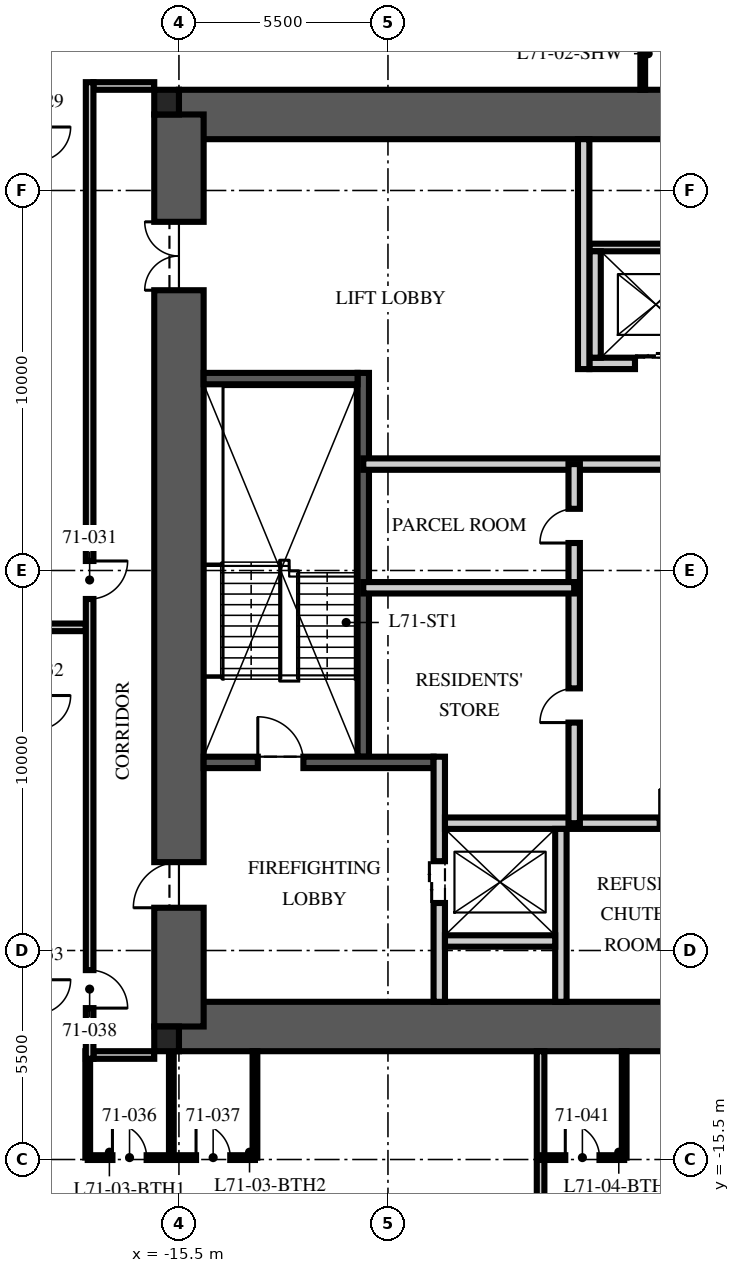
"""IFC4 building model, lengths in metres.
Left out: names, types, materials, properties, quantities, classifications, styles, units other than length and angle.
Written with IfcOpenShell. Run it as: python <this file> out.ifc"""

import sys

from ifc_helpers import new_model, si_unit, direction, frame, frame_2d, origin, origin_2d, place, context, subcontext, project, spatial, rectangle, extrude, element, fill, save


model = new_model("IFC4")
c1 = context("Model", 3, precision=1e-05, world=origin(), true_north=direction((0.0, 1.0)))
c2 = subcontext(c1, "Body", "Model", "MODEL_VIEW")
j1 = project(units=[si_unit("LENGTHUNIT", "METRE"), si_unit("PLANEANGLEUNIT", "RADIAN")], contexts=[c1])
p1 = place(None, origin())
s1 = spatial("IfcSite", under=j1, at=p1, CompositionType="ELEMENT")
p2 = place(p1, origin())
s2 = spatial("IfcBuilding", under=s1, at=p2, CompositionType="ELEMENT")
p3 = place(p2, frame((0.0, 0.0, 285.75)))
s3 = spatial("IfcBuildingStorey", under=s2, at=p3, CompositionType="ELEMENT", Elevation=285.75)
for number, where, z_axis, x_axis in (
    (1, (-15.5, 12.0, -0.25), (0.0, 0.0, 1.0), (1.0, 0.0, 0.0)),
    (2, (-15.5, -12.0, -0.25), (0.0, 0.0, 1.0), (1.0, 0.0, 0.0)),
):
    element("IfcWall", number, at=place(p3, frame(where, z_axis=z_axis, x_axis=x_axis)), inside=s3, PredefinedType="SHEAR", context=c2, shape_type="SweptSolid", body=[
        extrude(rectangle(XDim=31.0, YDim=1.3, at=frame_2d((15.5, 0.0))), origin(), (0.0, 0.0, 1.0), 3.75),
    ])
p4 = place(p3, frame((-15.5, -12.0, -0.25), z_axis=(0.0, 0.0, 1.0), x_axis=(0.0, 1.0, 0.0)))
e3 = element("IfcWall", 3, at=p4, inside=s3, PredefinedType="SHEAR", context=c2, shape_type="SweptSolid", body=[
    extrude(rectangle(XDim=24.0, YDim=1.3, at=frame_2d((12.0, 0.0))), origin(), (0.0, 0.0, 1.0), 3.75),
])
p5 = place(p4, frame((3.125, 0.0, 0.25)))
e4 = element("IfcOpeningElement", 4, at=p5, cuts=e3, PredefinedType="OPENING", context=c2, shape_type="SweptSolid", body=[
    extrude(rectangle(XDim=1.2, YDim=2.1, at=frame_2d((0.6, 1.05))), frame((0.0, 0.66, 0.0), z_axis=(0.0, -1.0, 0.0), x_axis=(1.0, 0.0, 0.0)), (0.0, 0.0, 1.0), 1.32),
])
p6 = place(p4, frame((19.375, 0.0, 0.25)))
e5 = element("IfcOpeningElement", 5, at=p6, cuts=e3, PredefinedType="OPENING", context=c2, shape_type="SweptSolid", body=[
    extrude(rectangle(XDim=1.8, YDim=2.1, at=frame_2d((0.9, 1.05))), frame((0.0, 0.66, 0.0), z_axis=(0.0, -1.0, 0.0), x_axis=(1.0, 0.0, 0.0)), (0.0, 0.0, 1.0), 1.32),
])
for number, where, z_axis, x_axis in (
    (6, (-15.825, 12.325, -0.25), (0.0, 0.0, 1.0), (1.0, 0.0, 0.0)),
    (7, (-15.825, -12.325, -0.25), (0.0, 0.0, 1.0), (1.0, 0.0, 0.0)),
):
    element("IfcColumn", number, at=place(p3, frame(where, z_axis=z_axis, x_axis=x_axis)), inside=s3, PredefinedType="COLUMN", context=c2, shape_type="SweptSolid", body=[
        extrude(rectangle(XDim=0.65, YDim=0.65, at=origin_2d()), origin(), (0.0, 0.0, 1.0), 3.75),
    ])
p7 = place(p3, frame((-10.65, -4.9, 0.0), z_axis=(0.0, 0.0, 1.0), x_axis=(0.0, 1.0, 0.0)))
e8 = element("IfcWall", 8, at=p7, inside=s3, PredefinedType="SOLIDWALL", context=c2, shape_type="SweptSolid", body=[
    extrude(rectangle(XDim=10.1, YDim=0.3, at=frame_2d((5.05, 0.0))), origin(), (0.0, 0.0, 1.0), 3.5),
])
p8 = place(p3, frame((-14.85, -5.05, 0.0), z_axis=(0.0, 0.0, 1.0), x_axis=(1.0, 0.0, 0.0)))
e9 = element("IfcWall", 9, at=p8, inside=s3, PredefinedType="SOLIDWALL", context=c2, shape_type="SweptSolid", body=[
    extrude(rectangle(XDim=6.05, YDim=0.3, at=frame_2d((3.025, 0.0))), origin(), (0.0, 0.0, 1.0), 3.5),
])
p9 = place(p8, frame((1.425, 0.0, 0.0)))
e10 = element("IfcOpeningElement", 10, at=p9, cuts=e9, PredefinedType="OPENING", context=c2, shape_type="SweptSolid", body=[
    extrude(rectangle(XDim=1.2, YDim=2.1, at=frame_2d((0.6, 1.05))), frame((0.0, 0.16, 0.0), z_axis=(0.0, -1.0, 0.0), x_axis=(1.0, 0.0, 0.0)), (0.0, 0.0, 1.0), 0.32),
])
p10 = place(p3, frame((-14.85, 5.05, 0.0), z_axis=(0.0, 0.0, 1.0), x_axis=(1.0, 0.0, 0.0)))
e11 = element("IfcWall", 11, at=p10, inside=s3, PredefinedType="SOLIDWALL", context=c2, shape_type="SweptSolid", body=[
    extrude(rectangle(XDim=4.05, YDim=0.3, at=frame_2d((2.025, 0.0))), origin(), (0.0, 0.0, 1.0), 3.5),
])
p11 = place(p3, frame((-8.65, -11.35, 0.0), z_axis=(0.0, 0.0, 1.0), x_axis=(0.0, 1.0, 0.0)))
e12 = element("IfcWall", 12, at=p11, inside=s3, PredefinedType="PARTITIONING", context=c2, shape_type="SweptSolid", body=[
    extrude(rectangle(XDim=6.45, YDim=0.3, at=frame_2d((3.225, 0.0))), origin(), (0.0, 0.0, 1.0), 3.5),
])
p12 = place(p11, frame((2.6, 0.0, 0.0)))
e13 = element("IfcOpeningElement", 13, at=p12, cuts=e12, PredefinedType="OPENING", context=c2, shape_type="SweptSolid", body=[
    extrude(rectangle(XDim=1.1, YDim=2.1, at=frame_2d((0.55, 1.05))), frame((0.0, 0.16, 0.0), z_axis=(0.0, -1.0, 0.0), x_axis=(1.0, 0.0, 0.0)), (0.0, 0.0, 1.0), 0.32),
])
p13 = place(p3, frame((-8.5, -6.65, 0.0), z_axis=(0.0, 0.0, 1.0), x_axis=(1.0, 0.0, 0.0)))
e14 = element("IfcWall", 14, at=p13, inside=s3, PredefinedType="PARTITIONING", context=c2, shape_type="SweptSolid", body=[
    extrude(rectangle(XDim=17.0, YDim=0.3, at=frame_2d((8.5, 0.0))), origin(), (0.0, 0.0, 1.0), 3.5),
])
p14 = place(p13, frame((7.8, 0.0, 0.0)))
e15 = element("IfcOpeningElement", 15, at=p14, cuts=e14, PredefinedType="OPENING", context=c2, shape_type="SweptSolid", body=[
    extrude(rectangle(XDim=1.3, YDim=2.4, at=frame_2d((0.65, 1.2))), frame((0.0, 0.16, 0.0), z_axis=(0.0, -1.0, 0.0), x_axis=(1.0, 0.0, 0.0)), (0.0, 0.0, 1.0), 0.32),
])
p15 = place(p13, frame((5.65, 0.0, 0.0)))
e16 = element("IfcOpeningElement", 16, at=p15, cuts=e14, PredefinedType="OPENING", context=c2, shape_type="SweptSolid", body=[
    extrude(rectangle(XDim=0.9, YDim=2.1, at=frame_2d((0.45, 1.05))), frame((0.0, 0.16, 0.0), z_axis=(0.0, -1.0, 0.0), x_axis=(1.0, 0.0, 0.0)), (0.0, 0.0, 1.0), 0.32),
])
p16 = place(p13, frame((10.4, 0.0, 0.0)))
e17 = element("IfcOpeningElement", 17, at=p16, cuts=e14, PredefinedType="OPENING", context=c2, shape_type="SweptSolid", body=[
    extrude(rectangle(XDim=0.9, YDim=2.1, at=frame_2d((0.45, 1.05))), frame((0.0, 0.16, 0.0), z_axis=(0.0, -1.0, 0.0), x_axis=(1.0, 0.0, 0.0)), (0.0, 0.0, 1.0), 0.32),
])
p17 = place(p3, frame((-5.45, -11.35, 0.0), z_axis=(0.0, 0.0, 1.0), x_axis=(0.0, 1.0, 0.0)))
e18 = element("IfcWall", 18, at=p17, inside=s3, PredefinedType="PARTITIONING", context=c2, shape_type="SweptSolid", body=[
    extrude(rectangle(XDim=4.55, YDim=0.3, at=frame_2d((2.275, 0.0))), origin(), (0.0, 0.0, 1.0), 3.5),
])
p18 = place(p3, frame((-8.5, -9.75, 0.0), z_axis=(0.0, 0.0, 1.0), x_axis=(1.0, 0.0, 0.0)))
e19 = element("IfcWall", 19, at=p18, inside=s3, PredefinedType="PARTITIONING", context=c2, shape_type="SweptSolid", body=[
    extrude(rectangle(XDim=2.9, YDim=0.3, at=frame_2d((1.45, 0.0))), origin(), (0.0, 0.0, 1.0), 3.5),
])
p19 = place(p3, frame((-4.7, 5.45, 0.0), z_axis=(0.0, 0.0, 1.0), x_axis=(1.0, 0.0, 0.0)))
e20 = element("IfcWall", 20, at=p19, inside=s3, PredefinedType="PARTITIONING", context=c2, shape_type="SweptSolid", body=[
    extrude(rectangle(XDim=9.7, YDim=0.3, at=frame_2d((4.85, 0.0))), origin(), (0.0, 0.0, 1.0), 3.5),
])
p20 = place(p19, frame((1.2, 0.0, 0.0)))
e21 = element("IfcOpeningElement", 21, at=p20, cuts=e20, PredefinedType="OPENING", context=c2, shape_type="SweptSolid", body=[
    extrude(rectangle(XDim=1.1, YDim=2.1, at=frame_2d((0.55, 1.05))), frame((0.0, 0.16, 0.0), z_axis=(0.0, -1.0, 0.0), x_axis=(1.0, 0.0, 0.0)), (0.0, 0.0, 1.0), 0.32),
])
p21 = place(p19, frame((4.3, 0.0, 0.0)))
e22 = element("IfcOpeningElement", 22, at=p21, cuts=e20, PredefinedType="OPENING", context=c2, shape_type="SweptSolid", body=[
    extrude(rectangle(XDim=1.1, YDim=2.1, at=frame_2d((0.55, 1.05))), frame((0.0, 0.16, 0.0), z_axis=(0.0, -1.0, 0.0), x_axis=(1.0, 0.0, 0.0)), (0.0, 0.0, 1.0), 0.32),
])
p22 = place(p19, frame((7.4, 0.0, 0.0)))
e23 = element("IfcOpeningElement", 23, at=p22, cuts=e20, PredefinedType="OPENING", context=c2, shape_type="SweptSolid", body=[
    extrude(rectangle(XDim=1.1, YDim=2.1, at=frame_2d((0.55, 1.05))), frame((0.0, 0.16, 0.0), z_axis=(0.0, -1.0, 0.0), x_axis=(1.0, 0.0, 0.0)), (0.0, 0.0, 1.0), 0.32),
])
p23 = place(p3, frame((-4.7, 8.5, 0.0), z_axis=(0.0, 0.0, 1.0), x_axis=(1.0, 0.0, 0.0)))
e24 = element("IfcWall", 24, at=p23, inside=s3, PredefinedType="PARTITIONING", context=c2, shape_type="SweptSolid", body=[
    extrude(rectangle(XDim=9.7, YDim=0.2, at=frame_2d((4.85, 0.0))), origin(), (0.0, 0.0, 1.0), 3.5),
])
p24 = place(p3, frame((-4.55, 5.6, 0.0), z_axis=(0.0, 0.0, 1.0), x_axis=(0.0, 1.0, 0.0)))
e25 = element("IfcWall", 25, at=p24, inside=s3, PredefinedType="PARTITIONING", context=c2, shape_type="SweptSolid", body=[
    extrude(rectangle(XDim=2.8, YDim=0.3, at=frame_2d((1.4, 0.0))), origin(), (0.0, 0.0, 1.0), 3.5),
])
p25 = place(p3, frame((-10.65, 2.8, 0.0), z_axis=(0.0, 0.0, 1.0), x_axis=(1.0, 0.0, 0.0)))
e26 = element("IfcWall", 26, at=p25, inside=s3, PredefinedType="PARTITIONING", context=c2, shape_type="SweptSolid", body=[
    extrude(rectangle(XDim=21.3, YDim=0.3, at=frame_2d((10.65, 0.0))), origin(), (0.0, 0.0, 1.0), 3.5),
])
p26 = place(p25, frame((10.05, 0.0, 0.0)))
e27 = element("IfcOpeningElement", 27, at=p26, cuts=e26, PredefinedType="OPENING", context=c2, shape_type="SweptSolid", body=[
    extrude(rectangle(XDim=1.2, YDim=2.1, at=frame_2d((0.6, 1.05))), frame((0.0, 0.16, 0.0), z_axis=(0.0, -1.0, 0.0), x_axis=(1.0, 0.0, 0.0)), (0.0, 0.0, 1.0), 0.32),
])
p27 = place(p25, frame((19.121, 0.0, 0.0)))
e28 = element("IfcOpeningElement", 28, at=p27, cuts=e26, PredefinedType="OPENING", context=c2, shape_type="SweptSolid", body=[
    extrude(rectangle(XDim=0.9, YDim=2.1, at=frame_2d((0.45, 1.05))), frame((0.0, 0.16, 0.0), z_axis=(0.0, -1.0, 0.0), x_axis=(1.0, 0.0, 0.0)), (0.0, 0.0, 1.0), 0.32),
])
p28 = place(p3, frame((-5.1, -6.65, 0.0), z_axis=(0.0, 0.0, 1.0), x_axis=(0.0, 1.0, 0.0)))
e29 = element("IfcWall", 29, at=p28, inside=s3, PredefinedType="PARTITIONING", context=c2, shape_type="SweptSolid", body=[
    extrude(rectangle(XDim=9.45, YDim=0.3, at=frame_2d((4.725, 0.0))), origin(), (0.0, 0.0, 1.0), 3.5),
])
p29 = place(p28, frame((2.648, 0.0, 0.0)))
e30 = element("IfcOpeningElement", 30, at=p29, cuts=e29, PredefinedType="OPENING", context=c2, shape_type="SweptSolid", body=[
    extrude(rectangle(XDim=0.9, YDim=2.1, at=frame_2d((0.45, 1.05))), frame((0.0, 0.16, 0.0), z_axis=(0.0, -1.0, 0.0), x_axis=(1.0, 0.0, 0.0)), (0.0, 0.0, 1.0), 0.32),
])
p30 = place(p28, frame((7.373, 0.0, 0.0)))
e31 = element("IfcOpeningElement", 31, at=p30, cuts=e29, PredefinedType="OPENING", context=c2, shape_type="SweptSolid", body=[
    extrude(rectangle(XDim=0.9, YDim=2.1, at=frame_2d((0.45, 1.05))), frame((0.0, 0.16, 0.0), z_axis=(0.0, -1.0, 0.0), x_axis=(1.0, 0.0, 0.0)), (0.0, 0.0, 1.0), 0.32),
])
p31 = place(p3, frame((-10.65, -0.455, 0.0), z_axis=(0.0, 0.0, 1.0), x_axis=(1.0, 0.0, 0.0)))
e32 = element("IfcWall", 32, at=p31, inside=s3, PredefinedType="PARTITIONING", context=c2, shape_type="SweptSolid", body=[
    extrude(rectangle(XDim=5.55, YDim=0.3, at=frame_2d((2.775, 0.0))), origin(), (0.0, 0.0, 1.0), 3.5),
])
p32 = place(p3, frame((-4.85, 5.3, 0.0), z_axis=(0.0, 0.0, 1.0), x_axis=(0.0, 1.0, 0.0)))
e33 = element("IfcWall", 33, at=p32, inside=s3, PredefinedType="PARTITIONING", context=c2, shape_type="SweptSolid", body=[
    extrude(rectangle(XDim=6.05, YDim=0.3, at=frame_2d((3.025, 0.0))), origin(), (0.0, 0.0, 1.0), 3.5),
])
for number, where, z_axis, x_axis in (
    (34, (-16.15, 12.75, 0.0), (0.0, 0.0, 1.0), (-1.0, 0.0, 0.0)),
    (35, (-16.15, -12.75, 0.0), (0.0, 0.0, 1.0), (-1.0, 0.0, 0.0)),
):
    element("IfcWall", number, at=place(p3, frame(where, z_axis=z_axis, x_axis=x_axis)), inside=s3, PredefinedType="PARTITIONING", context=c2, shape_type="SweptSolid", body=[
        extrude(rectangle(XDim=1.6, YDim=0.2, at=frame_2d((0.8, 0.0))), origin(), (0.0, 0.0, 1.0), 2.6),
    ])
p33 = place(p3, frame((-17.95, -1.496, 0.0), z_axis=(0.0, 0.0, 1.0), x_axis=(-1.0, 0.0, 0.0)))
e36 = element("IfcWall", 36, at=p33, inside=s3, PredefinedType="PARTITIONING", context=c2, shape_type="SweptSolid", body=[
    extrude(rectangle(XDim=5.8, YDim=0.2, at=frame_2d((2.9, 0.0))), origin(), (0.0, 0.0, 1.0), 3.01),
])
p34 = place(p3, frame((-5.984, -12.65, 0.0), z_axis=(0.0, 0.0, 1.0), x_axis=(0.0, -1.0, 0.0)))
e37 = element("IfcWall", 37, at=p34, inside=s3, PredefinedType="PARTITIONING", context=c2, shape_type="SweptSolid", body=[
    extrude(rectangle(XDim=11.1, YDim=0.2, at=frame_2d((5.55, 0.0))), origin(), (0.0, 0.0, 1.0), 3.01),
])
p35 = place(p3, frame((-3.296, 12.65, 0.0), z_axis=(0.0, 0.0, 1.0), x_axis=(0.0, 1.0, 0.0)))
e38 = element("IfcWall", 38, at=p35, inside=s3, PredefinedType="PARTITIONING", context=c2, shape_type="SweptSolid", body=[
    extrude(rectangle(XDim=2.8, YDim=0.125, at=frame_2d((1.4, 0.0))), origin(), (0.0, 0.0, 1.0), 3.5),
])
p36 = place(p3, frame((-17.9, -15.45, 0.0), z_axis=(0.0, 0.0, 1.0), x_axis=(1.0, 0.0, 0.0)))
e39 = element("IfcWall", 39, at=p36, inside=s3, PredefinedType="PARTITIONING", context=c2, shape_type="SweptSolid", body=[
    extrude(rectangle(XDim=4.4, YDim=0.125, at=frame_2d((2.2, 0.0))), origin(), (0.0, 0.0, 1.0), 2.6),
])
p37 = place(p36, frame((0.65, 0.0, 0.0)))
e40 = element("IfcOpeningElement", 40, at=p37, cuts=e39, PredefinedType="OPENING", context=c2, shape_type="SweptSolid", body=[
    extrude(rectangle(XDim=0.9, YDim=2.1, at=frame_2d((0.45, 1.05))), frame((0.0, 0.073, 0.0), z_axis=(0.0, -1.0, 0.0), x_axis=(1.0, 0.0, 0.0)), (0.0, 0.0, 1.0), 0.145),
])
p38 = place(p36, frame((2.85, 0.0, 0.0)))
e41 = element("IfcOpeningElement", 41, at=p38, cuts=e39, PredefinedType="OPENING", context=c2, shape_type="SweptSolid", body=[
    extrude(rectangle(XDim=0.9, YDim=2.1, at=frame_2d((0.45, 1.05))), frame((0.0, 0.073, 0.0), z_axis=(0.0, -1.0, 0.0), x_axis=(1.0, 0.0, 0.0)), (0.0, 0.0, 1.0), 0.145),
])
p39 = place(p3, frame((-17.9, -12.65, 0.0), z_axis=(0.0, 0.0, 1.0), x_axis=(0.0, -1.0, 0.0)))
e42 = element("IfcWall", 42, at=p39, inside=s3, PredefinedType="PARTITIONING", context=c2, shape_type="SweptSolid", body=[
    extrude(rectangle(XDim=2.8, YDim=0.125, at=frame_2d((1.4, 0.0))), origin(), (0.0, 0.0, 1.0), 2.9),
])
p40 = place(p3, frame((-15.7, -12.65, 0.0), z_axis=(0.0, 0.0, 1.0), x_axis=(0.0, -1.0, 0.0)))
e43 = element("IfcWall", 43, at=p40, inside=s3, PredefinedType="PARTITIONING", context=c2, shape_type="SweptSolid", body=[
    extrude(rectangle(XDim=2.8, YDim=0.125, at=frame_2d((1.4, 0.0))), origin(), (0.0, 0.0, 1.0), 2.6),
])
p41 = place(p3, frame((-13.5, -12.65, 0.0), z_axis=(0.0, 0.0, 1.0), x_axis=(0.0, -1.0, 0.0)))
e44 = element("IfcWall", 44, at=p41, inside=s3, PredefinedType="PARTITIONING", context=c2, shape_type="SweptSolid", body=[
    extrude(rectangle(XDim=2.8, YDim=0.125, at=frame_2d((1.4, 0.0))), origin(), (0.0, 0.0, 1.0), 3.5),
])
p42 = place(p3, frame((-5.984, -15.45, 0.0), z_axis=(0.0, 0.0, 1.0), x_axis=(1.0, 0.0, 0.0)))
e45 = element("IfcWall", 45, at=p42, inside=s3, PredefinedType="PARTITIONING", context=c2, shape_type="SweptSolid", body=[
    extrude(rectangle(XDim=2.2, YDim=0.125, at=frame_2d((1.1, 0.0))), origin(), (0.0, 0.0, 1.0), 2.91),
])
p43 = place(p42, frame((0.65, 0.0, 0.0)))
e46 = element("IfcOpeningElement", 46, at=p43, cuts=e45, PredefinedType="OPENING", context=c2, shape_type="SweptSolid", body=[
    extrude(rectangle(XDim=0.9, YDim=2.1, at=frame_2d((0.45, 1.05))), frame((0.0, 0.073, 0.0), z_axis=(0.0, -1.0, 0.0), x_axis=(1.0, 0.0, 0.0)), (0.0, 0.0, 1.0), 0.145),
])
p44 = place(p3, frame((-3.784, -12.65, 0.0), z_axis=(0.0, 0.0, 1.0), x_axis=(0.0, -1.0, 0.0)))
e47 = element("IfcWall", 47, at=p44, inside=s3, PredefinedType="PARTITIONING", context=c2, shape_type="SweptSolid", body=[
    extrude(rectangle(XDim=2.8, YDim=0.125, at=frame_2d((1.4, 0.0))), origin(), (0.0, 0.0, 1.0), 2.91),
])
p45 = place(p3, frame((-17.85, 12.85, 0.0), z_axis=(0.0, 0.0, 1.0), x_axis=(0.0, -1.0, 0.0)))
e48 = element("IfcWall", 48, at=p45, inside=s3, PredefinedType="PARTITIONING", context=c2, shape_type="SweptSolid", body=[
    extrude(rectangle(XDim=25.7, YDim=0.2, at=frame_2d((12.85, 0.0))), origin(), (0.0, 0.0, 1.0), 2.9),
])
p46 = place(p45, frame((12.6, 0.0, 0.0)))
e49 = element("IfcOpeningElement", 49, at=p46, cuts=e48, PredefinedType="OPENING", context=c2, shape_type="SweptSolid", body=[
    extrude(rectangle(XDim=1.0, YDim=2.2, at=frame_2d((0.5, 1.1))), frame((0.0, 0.11, 0.0), z_axis=(0.0, -1.0, 0.0), x_axis=(1.0, 0.0, 0.0)), (0.0, 0.0, 1.0), 0.22),
])
p47 = place(p45, frame((23.366, 0.0, 0.0)))
e50 = element("IfcOpeningElement", 50, at=p47, cuts=e48, PredefinedType="OPENING", context=c2, shape_type="SweptSolid", body=[
    extrude(rectangle(XDim=1.0, YDim=2.2, at=frame_2d((0.5, 1.1))), frame((0.0, 0.11, 0.0), z_axis=(0.0, -1.0, 0.0), x_axis=(1.0, 0.0, 0.0)), (0.0, 0.0, 1.0), 0.22),
])
p48 = place(p9, origin())
e51 = element("IfcDoor", 51, at=p48, inside=s3, OperationType="SINGLE_SWING_LEFT", PredefinedType="DOOR", context=c2, shape_type="SweptSolid", body=[
    extrude(rectangle(XDim=1.2, YDim=2.1, at=frame_2d((0.6, 1.05))), frame((0.0, 0.025, 0.0), z_axis=(0.0, -1.0, 0.0), x_axis=(1.0, 0.0, 0.0)), (0.0, 0.0, 1.0), 0.05),
])
fill(e10, e51)
p49 = place(p5, origin())
e52 = element("IfcDoor", 52, at=p49, inside=s3, OperationType="SINGLE_SWING_LEFT", PredefinedType="DOOR", context=c2, shape_type="SweptSolid", body=[
    extrude(rectangle(XDim=1.2, YDim=2.1, at=frame_2d((0.6, 1.05))), frame((0.0, 0.025, 0.0), z_axis=(0.0, -1.0, 0.0), x_axis=(1.0, 0.0, 0.0)), (0.0, 0.0, 1.0), 0.05),
])
fill(e4, e52)
p50 = place(p6, origin())
e53 = element("IfcDoor", 53, at=p50, inside=s3, OperationType="DOUBLE_DOOR_SINGLE_SWING", PredefinedType="DOOR", context=c2, shape_type="SweptSolid", body=[
    extrude(rectangle(XDim=1.8, YDim=2.1, at=frame_2d((0.9, 1.05))), frame((0.0, 0.025, 0.0), z_axis=(0.0, -1.0, 0.0), x_axis=(1.0, 0.0, 0.0)), (0.0, 0.0, 1.0), 0.05),
])
fill(e5, e53)
p51 = place(p12, origin())
e54 = element("IfcDoor", 54, at=p51, inside=s3, OperationType="DOUBLE_DOOR_SLIDING", PredefinedType="DOOR", context=c2, shape_type="SweptSolid", body=[
    extrude(rectangle(XDim=1.1, YDim=2.1, at=frame_2d((0.55, 1.05))), frame((0.0, 0.025, 0.0), z_axis=(0.0, -1.0, 0.0), x_axis=(1.0, 0.0, 0.0)), (0.0, 0.0, 1.0), 0.05),
])
fill(e13, e54)
p52 = place(p20, origin())
e55 = element("IfcDoor", 55, at=p52, inside=s3, OperationType="DOUBLE_DOOR_SLIDING", PredefinedType="DOOR", context=c2, shape_type="SweptSolid", body=[
    extrude(rectangle(XDim=1.1, YDim=2.1, at=frame_2d((0.55, 1.05))), frame((0.0, 0.025, 0.0), z_axis=(0.0, -1.0, 0.0), x_axis=(1.0, 0.0, 0.0)), (0.0, 0.0, 1.0), 0.05),
])
fill(e21, e55)
p53 = place(p15, origin())
e56 = element("IfcDoor", 56, at=p53, inside=s3, OperationType="SINGLE_SWING_LEFT", PredefinedType="DOOR", context=c2, shape_type="SweptSolid", body=[
    extrude(rectangle(XDim=0.9, YDim=2.1, at=frame_2d((0.45, 1.05))), frame((0.0, 0.025, 0.0), z_axis=(0.0, -1.0, 0.0), x_axis=(1.0, 0.0, 0.0)), (0.0, 0.0, 1.0), 0.05),
])
fill(e16, e56)
p54 = place(p29, origin())
e57 = element("IfcDoor", 57, at=p54, inside=s3, OperationType="SINGLE_SWING_LEFT", PredefinedType="DOOR", context=c2, shape_type="SweptSolid", body=[
    extrude(rectangle(XDim=0.9, YDim=2.1, at=frame_2d((0.45, 1.05))), frame((0.0, 0.025, 0.0), z_axis=(0.0, -1.0, 0.0), x_axis=(1.0, 0.0, 0.0)), (0.0, 0.0, 1.0), 0.05),
])
fill(e30, e57)
p55 = place(p30, origin())
e58 = element("IfcDoor", 58, at=p55, inside=s3, OperationType="SINGLE_SWING_LEFT", PredefinedType="DOOR", context=c2, shape_type="SweptSolid", body=[
    extrude(rectangle(XDim=0.9, YDim=2.1, at=frame_2d((0.45, 1.05))), frame((0.0, 0.025, 0.0), z_axis=(0.0, -1.0, 0.0), x_axis=(1.0, 0.0, 0.0)), (0.0, 0.0, 1.0), 0.05),
])
fill(e31, e58)
p56 = place(p46, origin())
e59 = element("IfcDoor", 59, at=p56, inside=s3, OperationType="SINGLE_SWING_LEFT", PredefinedType="DOOR", context=c2, shape_type="SweptSolid", body=[
    extrude(rectangle(XDim=1.0, YDim=2.2, at=frame_2d((0.5, 1.1))), frame((0.0, 0.025, 0.0), z_axis=(0.0, -1.0, 0.0), x_axis=(1.0, 0.0, 0.0)), (0.0, 0.0, 1.0), 0.05),
])
fill(e49, e59)
p57 = place(p37, origin())
e60 = element("IfcDoor", 60, at=p57, inside=s3, OperationType="SINGLE_SWING_LEFT", PredefinedType="DOOR", context=c2, shape_type="SweptSolid", body=[
    extrude(rectangle(XDim=0.9, YDim=2.1, at=frame_2d((0.45, 1.05))), frame((0.0, 0.025, 0.0), z_axis=(0.0, -1.0, 0.0), x_axis=(1.0, 0.0, 0.0)), (0.0, 0.0, 1.0), 0.05),
])
fill(e40, e60)
p58 = place(p38, origin())
e61 = element("IfcDoor", 61, at=p58, inside=s3, OperationType="SINGLE_SWING_LEFT", PredefinedType="DOOR", context=c2, shape_type="SweptSolid", body=[
    extrude(rectangle(XDim=0.9, YDim=2.1, at=frame_2d((0.45, 1.05))), frame((0.0, 0.025, 0.0), z_axis=(0.0, -1.0, 0.0), x_axis=(1.0, 0.0, 0.0)), (0.0, 0.0, 1.0), 0.05),
])
fill(e41, e61)
p59 = place(p47, origin())
e62 = element("IfcDoor", 62, at=p59, inside=s3, OperationType="SINGLE_SWING_RIGHT", PredefinedType="DOOR", context=c2, shape_type="SweptSolid", body=[
    extrude(rectangle(XDim=1.0, YDim=2.2, at=frame_2d((0.5, 1.1))), frame((0.0, 0.025, 0.0), z_axis=(0.0, -1.0, 0.0), x_axis=(1.0, 0.0, 0.0)), (0.0, 0.0, 1.0), 0.05),
])
fill(e50, e62)
p60 = place(p43, origin())
e63 = element("IfcDoor", 63, at=p60, inside=s3, OperationType="SINGLE_SWING_LEFT", PredefinedType="DOOR", context=c2, shape_type="SweptSolid", body=[
    extrude(rectangle(XDim=0.9, YDim=2.1, at=frame_2d((0.45, 1.05))), frame((0.0, 0.025, 0.0), z_axis=(0.0, -1.0, 0.0), x_axis=(1.0, 0.0, 0.0)), (0.0, 0.0, 1.0), 0.05),
])
fill(e46, e63)
save(model, sys.argv[1])
